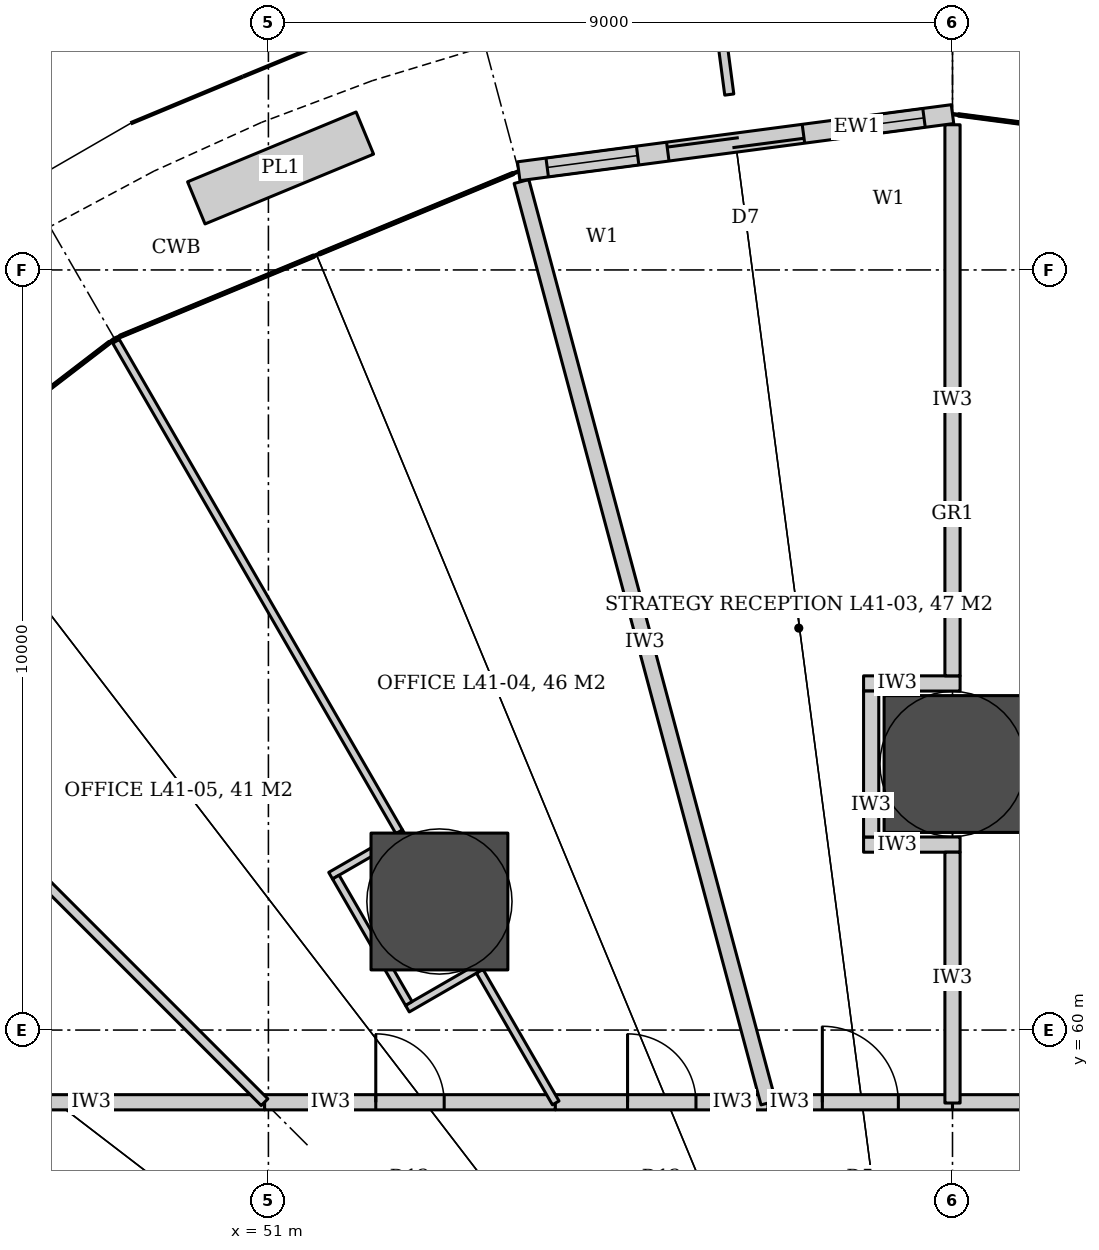
"""IFC4 building model, lengths in metres.
Left out: names, types, materials, properties, quantities, classifications, styles, units other than length and angle.
Written with IfcOpenShell. Run it as: python <this file> out.ifc"""

import sys

from ifc_helpers import new_model, si_unit, direction, frame, frame_2d, origin, origin_2d, place, context, subcontext, project, spatial, rectangle, hollow_circle, extrude, element, fill, save


model = new_model("IFC4")
c1 = context("Model", 3, precision=1e-05, world=origin(), true_north=direction((0.0, 1.0)))
c2 = subcontext(c1, "Body", "Model", "MODEL_VIEW")
j1 = project(units=[si_unit("LENGTHUNIT", "METRE"), si_unit("PLANEANGLEUNIT", "RADIAN")], contexts=[c1])
p1 = place(None, origin())
s1 = spatial("IfcSite", under=j1, at=p1, CompositionType="ELEMENT")
p2 = place(p1, origin())
s2 = spatial("IfcBuilding", under=s1, at=p2, CompositionType="ELEMENT")
p3 = place(p2, frame((0.0, 0.0, 173.0)))
s3 = spatial("IfcBuildingStorey", under=s2, at=p3, CompositionType="ELEMENT", Elevation=173.0)
for number, where, z_axis, x_axis in (
    (1, (60.0, 63.5, 0.0), (0.0, 0.0, 1.0), (1.0, 0.0, 0.0)),
    (2, (53.25, 61.691, 0.0), (0.0, 0.0, 1.0), (1.0, 0.0, 0.0)),
):
    element("IfcColumn", number, at=place(p3, frame(where, z_axis=z_axis, x_axis=x_axis)), inside=s3, PredefinedType="COLUMN", context=c2, shape_type="SweptSolid", body=[
        extrude(hollow_circle(Radius=0.508, WallThickness=0.05, at=origin_2d()), origin(), (0.0, 0.0, 1.0), 4.2),
    ])
p4 = place(p3, frame((43.4, 59.05, 0.0), z_axis=(0.0, 0.0, 1.0), x_axis=(1.0, 0.0, 0.0)))
e3 = element("IfcWall", 3, at=p4, inside=s3, PredefinedType="PARTITIONING", context=c2, shape_type="SweptSolid", body=[
    extrude(rectangle(XDim=7.55, YDim=0.2, at=frame_2d((3.775, 0.0))), origin(), (0.0, 0.0, 1.0), 3.012),
])
p5 = place(p3, frame((50.95, 59.05, 0.0), z_axis=(0.0, 0.0, 1.0), x_axis=(1.0, 0.0, 0.0)))
e4 = element("IfcWall", 4, at=p5, inside=s3, PredefinedType="PARTITIONING", context=c2, shape_type="SweptSolid", body=[
    extrude(rectangle(XDim=3.825, YDim=0.2, at=frame_2d((1.913, 0.0))), origin(), (0.0, 0.0, 1.0), 3.02),
])
p6 = place(p5, frame((1.462, 0.0, 0.0)))
e5 = element("IfcOpeningElement", 5, at=p6, cuts=e4, PredefinedType="OPENING", context=c2, shape_type="SweptSolid", body=[
    extrude(rectangle(XDim=0.9, YDim=2.4, at=frame_2d((0.45, 1.2))), frame((0.0, 0.11, 0.0), z_axis=(0.0, -1.0, 0.0), x_axis=(1.0, 0.0, 0.0)), (0.0, 0.0, 1.0), 0.22),
])
p7 = place(p3, frame((54.775, 59.05, 0.0), z_axis=(0.0, 0.0, 1.0), x_axis=(1.0, 0.0, 0.0)))
e6 = element("IfcWall", 6, at=p7, inside=s3, PredefinedType="PARTITIONING", context=c2, shape_type="SweptSolid", body=[
    extrude(rectangle(XDim=2.8, YDim=0.2, at=frame_2d((1.4, 0.0))), origin(), (0.0, 0.0, 1.0), 3.04),
])
p8 = place(p7, frame((0.95, 0.0, 0.0)))
e7 = element("IfcOpeningElement", 7, at=p8, cuts=e6, PredefinedType="OPENING", context=c2, shape_type="SweptSolid", body=[
    extrude(rectangle(XDim=0.9, YDim=2.4, at=frame_2d((0.45, 1.2))), frame((0.0, 0.11, 0.0), z_axis=(0.0, -1.0, 0.0), x_axis=(1.0, 0.0, 0.0)), (0.0, 0.0, 1.0), 0.22),
])
p9 = place(p3, frame((57.575, 59.05, 0.0), z_axis=(0.0, 0.0, 1.0), x_axis=(1.0, 0.0, 0.0)))
e8 = element("IfcWall", 8, at=p9, inside=s3, PredefinedType="PARTITIONING", context=c2, shape_type="SweptSolid", body=[
    extrude(rectangle(XDim=2.425, YDim=0.2, at=frame_2d((1.212, 0.0))), origin(), (0.0, 0.0, 1.0), 3.04),
])
p10 = place(p9, frame((0.712, 0.0, 0.0)))
e9 = element("IfcOpeningElement", 9, at=p10, cuts=e8, PredefinedType="OPENING", context=c2, shape_type="SweptSolid", body=[
    extrude(rectangle(XDim=1.0, YDim=2.1, at=frame_2d((0.5, 1.05))), frame((0.0, 0.11, 0.0), z_axis=(0.0, -1.0, 0.0), x_axis=(1.0, 0.0, 0.0)), (0.0, 0.0, 1.0), 0.22),
])
p11 = place(p3, frame((60.0, 59.05, 0.0), z_axis=(0.0, 0.0, 1.0), x_axis=(1.0, 0.0, 0.0)))
e10 = element("IfcWall", 10, at=p11, inside=s3, PredefinedType="PARTITIONING", context=c2, shape_type="SweptSolid", body=[
    extrude(rectangle(XDim=16.6, YDim=0.2, at=frame_2d((8.3, 0.0))), origin(), (0.0, 0.0, 1.0), 3.012),
])
p12 = place(p11, frame((7.3, 0.0, 0.0)))
e11 = element("IfcOpeningElement", 11, at=p12, cuts=e10, PredefinedType="OPENING", context=c2, shape_type="SweptSolid", body=[
    extrude(rectangle(XDim=2.0, YDim=2.1, at=frame_2d((1.0, 1.05))), frame((0.0, 0.11, 0.0), z_axis=(0.0, -1.0, 0.0), x_axis=(1.0, 0.0, 0.0)), (0.0, 0.0, 1.0), 0.22),
])
for number, where, z_axis, x_axis in (
    (12, (60.1, 62.832, 0.0), (0.0, 0.0, 1.0), (-1.0, 0.0, 0.0)),
    (13, (60.1, 64.168, 0.0), (0.0, 0.0, 1.0), (-1.0, 0.0, 0.0)),
):
    element("IfcWall", number, at=place(p3, frame(where, z_axis=z_axis, x_axis=x_axis)), inside=s3, PredefinedType="PARTITIONING", context=c2, shape_type="SweptSolid", body=[
        extrude(rectangle(XDim=0.878, YDim=0.2, at=frame_2d((0.439, 0.0))), origin(), (0.0, 0.0, 1.0), 3.012),
    ])
p13 = place(p3, frame((59.322, 62.932, 0.0), z_axis=(0.0, 0.0, 1.0), x_axis=(0.0, 1.0, 0.0)))
e14 = element("IfcWall", 14, at=p13, inside=s3, PredefinedType="PARTITIONING", context=c2, shape_type="SweptSolid", body=[
    extrude(rectangle(XDim=1.136, YDim=0.2, at=frame_2d((0.568, 0.0))), origin(), (0.0, 0.0, 1.0), 3.012),
])
p14 = place(p3, frame((60.0, 59.04, 0.0), z_axis=(0.0, 0.0, 1.0), x_axis=(0.0, 1.0, 0.0)))
e15 = element("IfcWall", 15, at=p14, inside=s3, PredefinedType="PARTITIONING", context=c2, shape_type="SweptSolid", body=[
    extrude(rectangle(XDim=3.692, YDim=0.2, at=frame_2d((1.846, 0.0))), origin(), (0.0, 0.0, 1.0), 3.04),
])
p15 = place(p3, frame((60.0, 64.268, 0.0), z_axis=(0.0, 0.0, 1.0), x_axis=(0.0, 1.0, 0.0)))
e16 = element("IfcWall", 16, at=p15, inside=s3, PredefinedType="PARTITIONING", context=c2, shape_type="SweptSolid", body=[
    extrude(rectangle(XDim=7.742, YDim=0.2, at=frame_2d((3.871, 0.0))), origin(), (0.0, 0.0, 1.0), 3.012),
])
p16 = place(p3, frame((57.577, 59.041, 0.0), z_axis=(0.0, 0.0, 1.0), x_axis=(-0.258808436689, 0.965928668743, 0.0)))
e17 = element("IfcWall", 17, at=p16, inside=s3, PredefinedType="PARTITIONING", context=c2, shape_type="SweptSolid", body=[
    extrude(rectangle(XDim=12.65, YDim=0.2, at=frame_2d((6.325, 0.0))), origin(), (0.0, 0.0, 1.0), 3.012),
])
for number, where, z_axis, x_axis in (
    (18, (53.602, 61.181, 0.0), (0.0, 0.0, 1.0), (-0.866, -0.5, 0.0)),
    (19, (52.984, 62.251, 0.0), (0.0, 0.0, 1.0), (-0.866, -0.5, 0.0)),
):
    element("IfcWall", number, at=place(p3, frame(where, z_axis=z_axis, x_axis=x_axis)), inside=s3, PredefinedType="PARTITIONING", context=c2, shape_type="SweptSolid", body=[
        extrude(rectangle(XDim=0.728, YDim=0.1, at=frame_2d((0.364, 0.0))), origin(), (0.0, 0.0, 1.0), 3.012),
    ])
p17 = place(p3, frame((52.99, 60.885, 0.0), z_axis=(0.0, 0.0, 1.0), x_axis=(-0.499976747263, 0.866038828342, 0.0)))
e20 = element("IfcWall", 20, at=p17, inside=s3, PredefinedType="PARTITIONING", context=c2, shape_type="SweptSolid", body=[
    extrude(rectangle(XDim=1.136, YDim=0.1, at=frame_2d((0.568, 0.0))), origin(), (0.0, 0.0, 1.0), 3.012),
])
p18 = place(p3, frame((54.78, 59.041, 0.0), z_axis=(0.0, 0.0, 1.0), x_axis=(-0.500014005679, 0.866017317451, 0.0)))
e21 = element("IfcWall", 21, at=p18, inside=s3, PredefinedType="PARTITIONING", context=c2, shape_type="SweptSolid", body=[
    extrude(rectangle(XDim=2.392, YDim=0.1, at=frame_2d((1.196, 0.0))), origin(), (0.0, 0.0, 1.0), 3.04),
])
p19 = place(p3, frame((52.916, 62.27, 0.0), z_axis=(0.0, 0.0, 1.0), x_axis=(-0.499997422768, 0.866026891745, 0.0)))
e22 = element("IfcWall", 22, at=p19, inside=s3, PredefinedType="PARTITIONING", context=c2, shape_type="SweptSolid", body=[
    extrude(rectangle(XDim=7.942, YDim=0.1, at=frame_2d((3.971, 0.0))), origin(), (0.0, 0.0, 1.0), 3.012),
])
p20 = place(p3, frame((50.949, 59.051, 0.0), z_axis=(0.0, 0.0, 1.0), x_axis=(-0.707106781187, 0.707106781187, 0.0)))
e23 = element("IfcWall", 23, at=p20, inside=s3, PredefinedType="PARTITIONING", context=c2, shape_type="SweptSolid", body=[
    extrude(rectangle(XDim=9.31, YDim=0.125, at=frame_2d((4.655, 0.0))), origin(), (0.0, 0.0, 1.0), 3.012),
])
p21 = place(p3, frame((60.0, 72.15, 0.0), z_axis=(0.0, 0.0, 1.0), x_axis=(-0.991447396143, -0.130506937291, 0.0)))
e24 = element("IfcWall", 24, at=p21, inside=s3, PredefinedType="SOLIDWALL", context=c2, shape_type="SweptSolid", body=[
    extrude(rectangle(XDim=5.782, YDim=0.25, at=frame_2d((2.891, 0.0))), origin(), (0.0, 0.0, 1.0), 4.04),
])
p22 = place(p21, frame((1.991, 0.0, 0.0)))
e25 = element("IfcOpeningElement", 25, at=p22, cuts=e24, PredefinedType="OPENING", context=c2, shape_type="SweptSolid", body=[
    extrude(rectangle(XDim=1.8, YDim=2.4, at=frame_2d((0.9, 1.2))), frame((0.0, 0.135, 0.0), z_axis=(0.0, -1.0, 0.0), x_axis=(1.0, 0.0, 0.0)), (0.0, 0.0, 1.0), 0.27),
])
p23 = place(p21, frame((0.391, 0.0, 0.0)))
e26 = element("IfcOpeningElement", 26, at=p23, cuts=e24, PredefinedType="OPENING", context=c2, shape_type="SweptSolid", body=[
    extrude(rectangle(XDim=1.2, YDim=2.4, at=frame_2d((0.6, 1.2))), frame((0.0, 0.135, 0.0), z_axis=(0.0, -1.0, 0.0), x_axis=(1.0, 0.0, 0.0)), (0.0, 0.0, 1.0), 0.27),
])
p24 = place(p21, frame((4.191, 0.0, 0.0)))
e27 = element("IfcOpeningElement", 27, at=p24, cuts=e24, PredefinedType="OPENING", context=c2, shape_type="SweptSolid", body=[
    extrude(rectangle(XDim=1.2, YDim=2.4, at=frame_2d((0.6, 1.2))), frame((0.0, 0.135, 0.0), z_axis=(0.0, -1.0, 0.0), x_axis=(1.0, 0.0, 0.0)), (0.0, 0.0, 1.0), 0.27),
])
p25 = place(p10, origin())
e28 = element("IfcDoor", 28, at=p25, inside=s3, OperationType="SINGLE_SWING_LEFT", PredefinedType="DOOR", context=c2, shape_type="SweptSolid", body=[
    extrude(rectangle(XDim=1.0, YDim=2.1, at=frame_2d((0.5, 1.05))), frame((0.0, 0.025, 0.0), z_axis=(0.0, -1.0, 0.0), x_axis=(1.0, 0.0, 0.0)), (0.0, 0.0, 1.0), 0.05),
])
fill(e9, e28)
p26 = place(p8, origin())
e29 = element("IfcDoor", 29, at=p26, inside=s3, OperationType="SINGLE_SWING_LEFT", PredefinedType="DOOR", context=c2, shape_type="SweptSolid", body=[
    extrude(rectangle(XDim=0.9, YDim=2.4, at=frame_2d((0.45, 1.2))), frame((0.0, 0.025, 0.0), z_axis=(0.0, -1.0, 0.0), x_axis=(1.0, 0.0, 0.0)), (0.0, 0.0, 1.0), 0.05),
])
fill(e7, e29)
p27 = place(p6, origin())
e30 = element("IfcDoor", 30, at=p27, inside=s3, OperationType="SINGLE_SWING_LEFT", PredefinedType="DOOR", context=c2, shape_type="SweptSolid", body=[
    extrude(rectangle(XDim=0.9, YDim=2.4, at=frame_2d((0.45, 1.2))), frame((0.0, 0.025, 0.0), z_axis=(0.0, -1.0, 0.0), x_axis=(1.0, 0.0, 0.0)), (0.0, 0.0, 1.0), 0.05),
])
fill(e5, e30)
p28 = place(p22, origin())
e31 = element("IfcDoor", 31, at=p28, inside=s3, OperationType="DOUBLE_DOOR_SLIDING", PredefinedType="DOOR", context=c2, shape_type="SweptSolid", body=[
    extrude(rectangle(XDim=1.8, YDim=2.4, at=frame_2d((0.9, 1.2))), frame((0.0, 0.025, 0.0), z_axis=(0.0, -1.0, 0.0), x_axis=(1.0, 0.0, 0.0)), (0.0, 0.0, 1.0), 0.05),
])
fill(e25, e31)
p29 = place(p23, origin())
e32 = element("IfcWindow", 32, at=p29, inside=s3, PartitioningType="SINGLE_PANEL", PredefinedType="WINDOW", context=c2, shape_type="SweptSolid", body=[
    extrude(rectangle(XDim=1.2, YDim=2.4, at=frame_2d((0.6, 1.2))), frame((0.0, 0.03, 0.0), z_axis=(0.0, -1.0, 0.0), x_axis=(1.0, 0.0, 0.0)), (0.0, 0.0, 1.0), 0.06),
])
fill(e26, e32)
p30 = place(p24, origin())
e33 = element("IfcWindow", 33, at=p30, inside=s3, PartitioningType="SINGLE_PANEL", PredefinedType="WINDOW", context=c2, shape_type="SweptSolid", body=[
    extrude(rectangle(XDim=1.2, YDim=2.4, at=frame_2d((0.6, 1.2))), frame((0.0, 0.03, 0.0), z_axis=(0.0, -1.0, 0.0), x_axis=(1.0, 0.0, 0.0)), (0.0, 0.0, 1.0), 0.06),
])
fill(e27, e33)
save(model, sys.argv[1])
